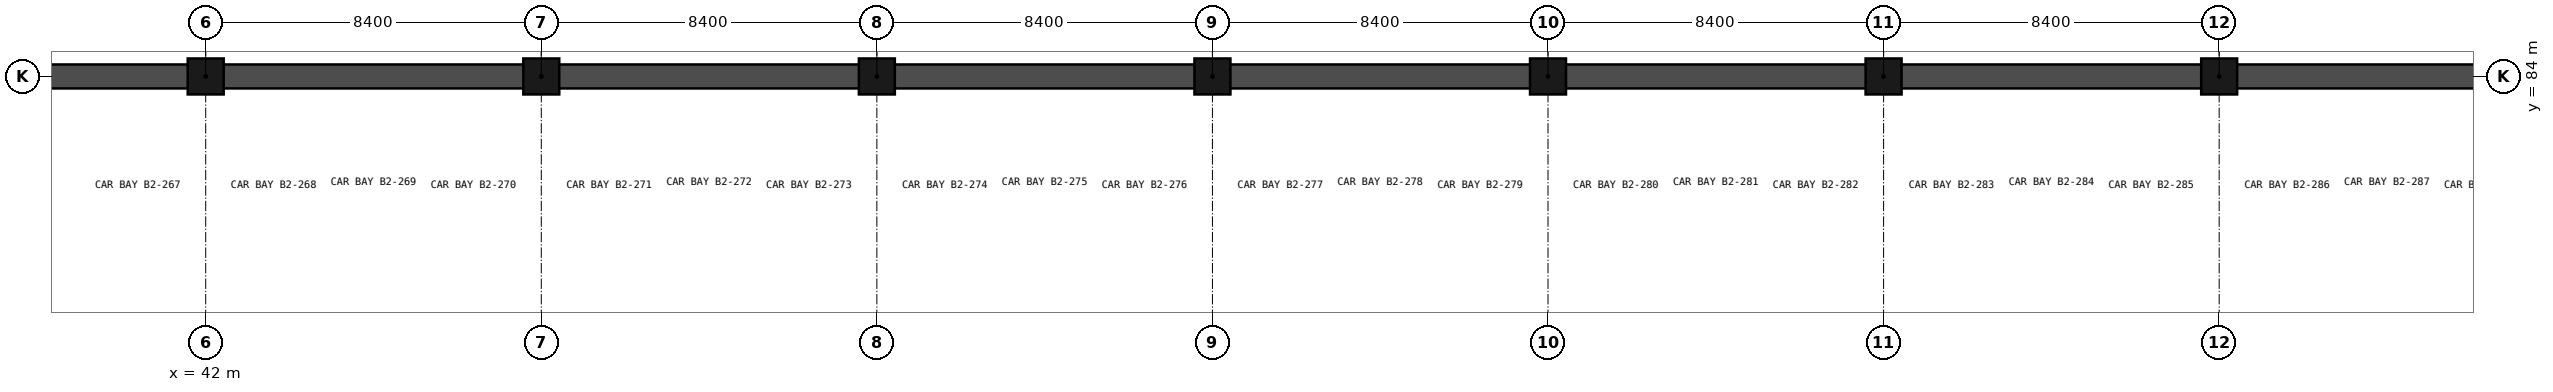
"""IFC4 building model, lengths in metres.
Left out: names, types, materials, properties, quantities, classifications, styles, units other than length and angle.
Written with IfcOpenShell. Run it as: python <this file> out.ifc"""

import sys

from ifc_helpers import new_model, si_unit, direction, frame, frame_2d, origin, origin_2d, place, context, subcontext, project, spatial, rectangle, extrude, element, save


model = new_model("IFC4")
c1 = context("Model", 3, precision=1e-05, world=origin(), true_north=direction((0.0, 1.0)))
c2 = subcontext(c1, "Body", "Model", "MODEL_VIEW")
j1 = project(units=[si_unit("LENGTHUNIT", "METRE"), si_unit("PLANEANGLEUNIT", "RADIAN")], contexts=[c1])
p1 = place(None, origin())
s1 = spatial("IfcSite", under=j1, at=p1, CompositionType="ELEMENT")
p2 = place(p1, origin())
s2 = spatial("IfcBuilding", under=s1, at=p2, CompositionType="ELEMENT")
p3 = place(p2, frame((0.0, 0.0, -9.6)))
s3 = spatial("IfcBuildingStorey", under=s2, at=p3, CompositionType="ELEMENT", Elevation=-9.6)
for number, where, z_axis, x_axis in (
    (1, (42.0, 84.0, -0.25), (0.0, 0.0, 1.0), (1.0, 0.0, 0.0)),
    (2, (50.4, 84.0, -0.25), (0.0, 0.0, 1.0), (1.0, 0.0, 0.0)),
    (3, (58.8, 84.0, -0.25), (0.0, 0.0, 1.0), (1.0, 0.0, 0.0)),
    (4, (67.2, 84.0, -0.25), (0.0, 0.0, 1.0), (1.0, 0.0, 0.0)),
    (5, (75.6, 84.0, -0.25), (0.0, 0.0, 1.0), (1.0, 0.0, 0.0)),
    (6, (84.0, 84.0, -0.25), (0.0, 0.0, 1.0), (1.0, 0.0, 0.0)),
    (7, (92.4, 84.0, -0.25), (0.0, 0.0, 1.0), (1.0, 0.0, 0.0)),
):
    element("IfcColumn", number, at=place(p3, frame(where, z_axis=z_axis, x_axis=x_axis)), inside=s3, PredefinedType="COLUMN", context=c2, shape_type="SweptSolid", body=[
        extrude(rectangle(XDim=0.9, YDim=0.9, at=origin_2d()), origin(), (0.0, 0.0, 1.0), 4.75),
    ])
p4 = place(p3, frame((143.1, 84.0, -0.25), z_axis=(0.0, 0.0, 1.0), x_axis=(-1.0, 0.0, 0.0)))
e8 = element("IfcWall", 8, at=p4, inside=s3, PredefinedType="SOLIDWALL", context=c2, shape_type="SweptSolid", body=[
    extrude(rectangle(XDim=109.8, YDim=0.6, at=frame_2d((54.9, 0.0))), origin(), (0.0, 0.0, 1.0), 4.75),
])
save(model, sys.argv[1])
